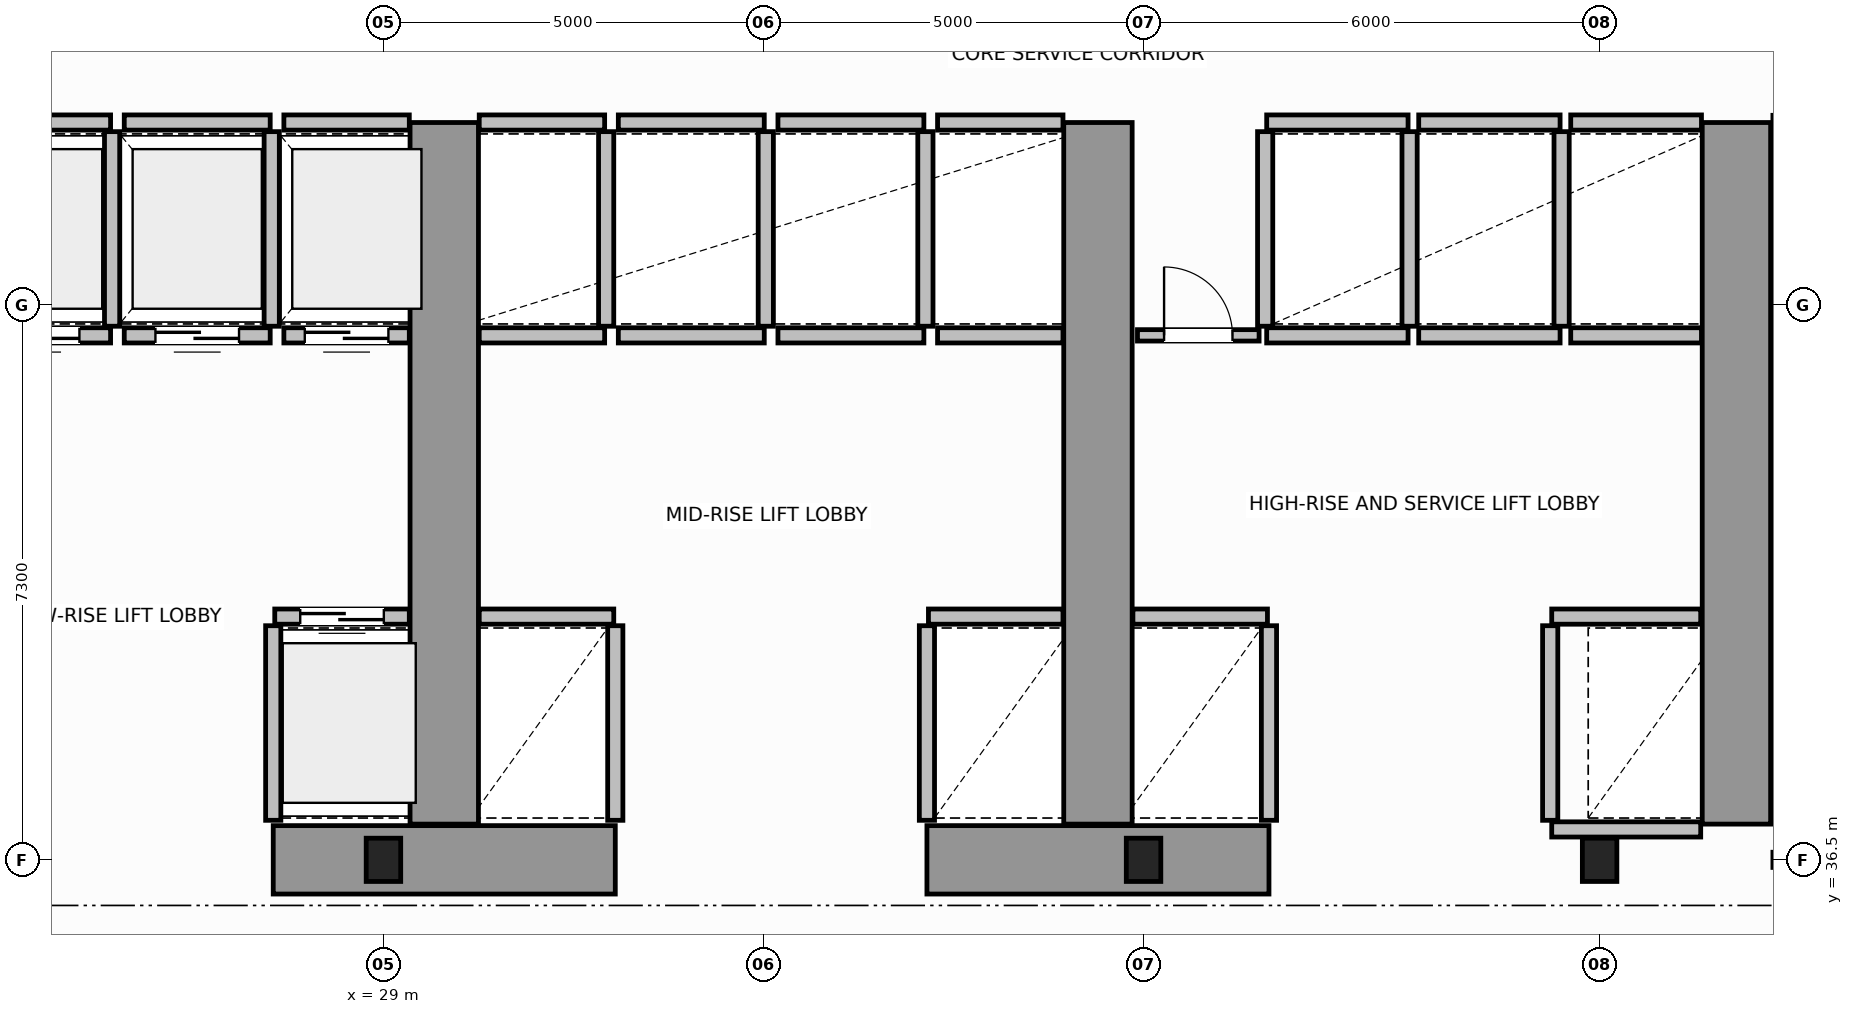
"""IFC4 building model, lengths in metres.
Left out: names, types, materials, properties, quantities, classifications, styles, units other than length and angle.
Written with IfcOpenShell. Run it as: python <this file> out.ifc"""

import sys

from ifc_helpers import new_model, si_unit, direction, frame, frame_2d, origin, origin_2d, place, context, subcontext, project, spatial, rectangle, i_section, extrude, source, transform, mapped, element, fill, save


model = new_model("IFC4")
c1 = context("Model", 3, precision=1e-05, world=origin(), true_north=direction((0.0, 1.0)))
c2 = subcontext(c1, "Body", "Model", "MODEL_VIEW")
j1 = project(units=[si_unit("LENGTHUNIT", "METRE"), si_unit("PLANEANGLEUNIT", "RADIAN")], contexts=[c1])
p1 = place(None, origin())
s1 = spatial("IfcSite", under=j1, at=p1, CompositionType="ELEMENT")
p2 = place(p1, origin())
s2 = spatial("IfcBuilding", under=s1, at=p2, CompositionType="ELEMENT")
p3 = place(p2, frame((0.0, 0.0, 18.8)))
s3 = spatial("IfcBuildingStorey", under=s2, at=p3, CompositionType="ELEMENT", Elevation=18.8)
m1 = source(origin(), c2, "Body", "SweptSolid", [
    extrude(i_section(OverallWidth=0.454, OverallDepth=0.569, WebThickness=0.078, FlangeThickness=0.08, FilletRadius=0.015, at=origin_2d()), origin(), (0.0, 0.0, 1.0), 3.8),
])
for number, where, z_axis, x_axis in (
    (1, (29.0, 36.5, 0.0), (0.0, 0.0, 1.0), (1.0, 0.0, 0.0)),
    (2, (39.0, 36.5, 0.0), (0.0, 0.0, 1.0), (1.0, 0.0, 0.0)),
    (3, (45.0, 36.5, 0.0), (0.0, 0.0, 1.0), (1.0, 0.0, 0.0)),
):
    element("IfcColumn", number, at=place(p3, frame(where, z_axis=z_axis, x_axis=x_axis)), inside=s3, PredefinedType="COLUMN", context=c2, shape_type="MappedRepresentation", body=[
        mapped(m1, transform((0.0, 0.0, 0.0), scale=1.0)),
    ])
for number, where, z_axis, x_axis in (
    (4, (27.55, 36.5, 0.0), (0.0, 0.0, 1.0), (1.0, 0.0, 0.0)),
    (5, (36.15, 36.5, 0.0), (0.0, 0.0, 1.0), (1.0, 0.0, 0.0)),
):
    element("IfcWall", number, at=place(p3, frame(where, z_axis=z_axis, x_axis=x_axis)), inside=s3, PredefinedType="SHEAR", context=c2, shape_type="SweptSolid", body=[
        extrude(rectangle(XDim=4.5, YDim=0.9, at=frame_2d((2.25, 0.0))), origin(), (0.0, 0.0, 1.0), 3.8),
    ])
for number, where, z_axis, x_axis in (
    (6, (29.8, 36.97, 0.0), (0.0, 0.0, 1.0), (0.0, 1.0, 0.0)),
    (7, (38.4, 36.97, 0.0), (0.0, 0.0, 1.0), (0.0, 1.0, 0.0)),
    (8, (46.8, 36.97, 0.0), (0.0, 0.0, 1.0), (0.0, 1.0, 0.0)),
):
    element("IfcWall", number, at=place(p3, frame(where, z_axis=z_axis, x_axis=x_axis)), inside=s3, PredefinedType="SHEAR", context=c2, shape_type="SweptSolid", body=[
        extrude(rectangle(XDim=9.23, YDim=0.9, at=frame_2d((4.615, 0.0))), origin(), (0.0, 0.0, 1.0), 3.8),
    ])
p4 = place(p3, frame((47.28, 36.5, 0.0), z_axis=(0.0, 0.0, 1.0), x_axis=(1.0, 0.0, 0.0)))
e9 = element("IfcWall", 9, at=p4, inside=s3, PredefinedType="SOLIDWALL", context=c2, shape_type="SweptSolid", body=[
    extrude(rectangle(XDim=2.47, YDim=0.2, at=frame_2d((1.235, 0.0))), origin(), (0.0, 0.0, 1.0), 2.37),
])
p5 = place(p4, frame((0.65, 0.0, 0.0)))
e10 = element("IfcOpeningElement", 10, at=p5, cuts=e9, PredefinedType="OPENING", context=c2, shape_type="SweptSolid", body=[
    extrude(rectangle(XDim=1.1, YDim=2.15, at=frame_2d((0.55, 1.075))), frame((0.0, 0.11, 0.0), z_axis=(0.0, -1.0, 0.0), x_axis=(1.0, 0.0, 0.0)), (0.0, 0.0, 1.0), 0.22),
])
p6 = place(p3, frame((27.57, 39.7, 0.0), z_axis=(0.0, 0.0, 1.0), x_axis=(1.0, 0.0, 0.0)))
e11 = element("IfcWall", 11, at=p6, inside=s3, PredefinedType="SOLIDWALL", context=c2, shape_type="SweptSolid", body=[
    extrude(rectangle(XDim=1.77, YDim=0.2, at=frame_2d((0.885, 0.0))), origin(), (0.0, 0.0, 1.0), 3.58),
])
p7 = place(p6, frame((0.335, 0.0, 0.0)))
e12 = element("IfcOpeningElement", 12, at=p7, cuts=e11, PredefinedType="OPENING", context=c2, shape_type="SweptSolid", body=[
    extrude(rectangle(XDim=1.1, YDim=2.15, at=frame_2d((0.55, 1.075))), frame((0.0, 0.11, 0.0), z_axis=(0.0, -1.0, 0.0), x_axis=(1.0, 0.0, 0.0)), (0.0, 0.0, 1.0), 0.22),
])
p8 = place(p3, frame((27.55, 37.02, 0.0), z_axis=(0.0, 0.0, 1.0), x_axis=(0.0, 1.0, 0.0)))
e13 = element("IfcWall", 13, at=p8, inside=s3, PredefinedType="SOLIDWALL", context=c2, shape_type="SweptSolid", body=[
    extrude(rectangle(XDim=2.56, YDim=0.2, at=frame_2d((1.28, 0.0))), origin(), (0.0, 0.0, 1.0), 3.58),
])
p9 = place(p3, frame((23.49, 43.4, 0.0), z_axis=(0.0, 0.0, 1.0), x_axis=(1.0, 0.0, 0.0)))
e14 = element("IfcWall", 14, at=p9, inside=s3, PredefinedType="SOLIDWALL", context=c2, shape_type="SweptSolid", body=[
    extrude(rectangle(XDim=1.92, YDim=0.2, at=frame_2d((0.96, 0.0))), origin(), (0.0, 0.0, 1.0), 3.58),
])
p10 = place(p9, frame((0.41, 0.0, 0.0)))
e15 = element("IfcOpeningElement", 15, at=p10, cuts=e14, PredefinedType="OPENING", context=c2, shape_type="SweptSolid", body=[
    extrude(rectangle(XDim=1.1, YDim=2.15, at=frame_2d((0.55, 1.075))), frame((0.0, 0.11, 0.0), z_axis=(0.0, -1.0, 0.0), x_axis=(1.0, 0.0, 0.0)), (0.0, 0.0, 1.0), 0.22),
])
p11 = place(p3, frame((23.49, 46.2, 0.0), z_axis=(0.0, 0.0, 1.0), x_axis=(1.0, 0.0, 0.0)))
e16 = element("IfcWall", 16, at=p11, inside=s3, PredefinedType="SOLIDWALL", context=c2, shape_type="SweptSolid", body=[
    extrude(rectangle(XDim=1.92, YDim=0.2, at=frame_2d((0.96, 0.0))), origin(), (0.0, 0.0, 1.0), 3.58),
])
p12 = place(p3, frame((25.43, 43.52, 0.0), z_axis=(0.0, 0.0, 1.0), x_axis=(0.0, 1.0, 0.0)))
e17 = element("IfcWall", 17, at=p12, inside=s3, PredefinedType="SOLIDWALL", context=c2, shape_type="SweptSolid", body=[
    extrude(rectangle(XDim=2.56, YDim=0.2, at=frame_2d((1.28, 0.0))), origin(), (0.0, 0.0, 1.0), 3.58),
])
p13 = place(p3, frame((25.59, 43.4, 0.0), z_axis=(0.0, 0.0, 1.0), x_axis=(1.0, 0.0, 0.0)))
e18 = element("IfcWall", 18, at=p13, inside=s3, PredefinedType="SOLIDWALL", context=c2, shape_type="SweptSolid", body=[
    extrude(rectangle(XDim=1.92, YDim=0.2, at=frame_2d((0.96, 0.0))), origin(), (0.0, 0.0, 1.0), 3.58),
])
p14 = place(p13, frame((0.41, 0.0, 0.0)))
e19 = element("IfcOpeningElement", 19, at=p14, cuts=e18, PredefinedType="OPENING", context=c2, shape_type="SweptSolid", body=[
    extrude(rectangle(XDim=1.1, YDim=2.15, at=frame_2d((0.55, 1.075))), frame((0.0, 0.11, 0.0), z_axis=(0.0, -1.0, 0.0), x_axis=(1.0, 0.0, 0.0)), (0.0, 0.0, 1.0), 0.22),
])
p15 = place(p3, frame((25.59, 46.2, 0.0), z_axis=(0.0, 0.0, 1.0), x_axis=(1.0, 0.0, 0.0)))
e20 = element("IfcWall", 20, at=p15, inside=s3, PredefinedType="SOLIDWALL", context=c2, shape_type="SweptSolid", body=[
    extrude(rectangle(XDim=1.92, YDim=0.2, at=frame_2d((0.96, 0.0))), origin(), (0.0, 0.0, 1.0), 3.58),
])
p16 = place(p3, frame((27.53, 43.52, 0.0), z_axis=(0.0, 0.0, 1.0), x_axis=(0.0, 1.0, 0.0)))
e21 = element("IfcWall", 21, at=p16, inside=s3, PredefinedType="SOLIDWALL", context=c2, shape_type="SweptSolid", body=[
    extrude(rectangle(XDim=2.56, YDim=0.2, at=frame_2d((1.28, 0.0))), origin(), (0.0, 0.0, 1.0), 3.58),
])
p17 = place(p3, frame((27.69, 43.4, 0.0), z_axis=(0.0, 0.0, 1.0), x_axis=(1.0, 0.0, 0.0)))
e22 = element("IfcWall", 22, at=p17, inside=s3, PredefinedType="SOLIDWALL", context=c2, shape_type="SweptSolid", body=[
    extrude(rectangle(XDim=1.65, YDim=0.2, at=frame_2d((0.825, 0.0))), origin(), (0.0, 0.0, 1.0), 3.58),
])
p18 = place(p17, frame((0.275, 0.0, 0.0)))
e23 = element("IfcOpeningElement", 23, at=p18, cuts=e22, PredefinedType="OPENING", context=c2, shape_type="SweptSolid", body=[
    extrude(rectangle(XDim=1.1, YDim=2.15, at=frame_2d((0.55, 1.075))), frame((0.0, 0.11, 0.0), z_axis=(0.0, -1.0, 0.0), x_axis=(1.0, 0.0, 0.0)), (0.0, 0.0, 1.0), 0.22),
])
p19 = place(p3, frame((27.69, 46.2, 0.0), z_axis=(0.0, 0.0, 1.0), x_axis=(1.0, 0.0, 0.0)))
e24 = element("IfcWall", 24, at=p19, inside=s3, PredefinedType="SOLIDWALL", context=c2, shape_type="SweptSolid", body=[
    extrude(rectangle(XDim=1.65, YDim=0.2, at=frame_2d((0.825, 0.0))), origin(), (0.0, 0.0, 1.0), 3.58),
])
p20 = place(p3, frame((30.26, 39.7, 0.0), z_axis=(0.0, 0.0, 1.0), x_axis=(1.0, 0.0, 0.0)))
e25 = element("IfcWall", 25, at=p20, inside=s3, PredefinedType="SOLIDWALL", context=c2, shape_type="SweptSolid", body=[
    extrude(rectangle(XDim=1.77, YDim=0.2, at=frame_2d((0.885, 0.0))), origin(), (0.0, 0.0, 1.0), 3.58),
])
p21 = place(p3, frame((32.05, 37.02, 0.0), z_axis=(0.0, 0.0, 1.0), x_axis=(0.0, 1.0, 0.0)))
e26 = element("IfcWall", 26, at=p21, inside=s3, PredefinedType="SOLIDWALL", context=c2, shape_type="SweptSolid", body=[
    extrude(rectangle(XDim=2.56, YDim=0.2, at=frame_2d((1.28, 0.0))), origin(), (0.0, 0.0, 1.0), 3.58),
])
p22 = place(p3, frame((36.17, 39.7, 0.0), z_axis=(0.0, 0.0, 1.0), x_axis=(1.0, 0.0, 0.0)))
e27 = element("IfcWall", 27, at=p22, inside=s3, PredefinedType="SOLIDWALL", context=c2, shape_type="SweptSolid", body=[
    extrude(rectangle(XDim=1.77, YDim=0.2, at=frame_2d((0.885, 0.0))), origin(), (0.0, 0.0, 1.0), 3.58),
])
p23 = place(p3, frame((36.15, 37.02, 0.0), z_axis=(0.0, 0.0, 1.0), x_axis=(0.0, 1.0, 0.0)))
e28 = element("IfcWall", 28, at=p23, inside=s3, PredefinedType="SOLIDWALL", context=c2, shape_type="SweptSolid", body=[
    extrude(rectangle(XDim=2.56, YDim=0.2, at=frame_2d((1.28, 0.0))), origin(), (0.0, 0.0, 1.0), 3.58),
])
for number, where, z_axis, x_axis in (
    (29, (30.26, 43.4, 0.0), (0.0, 0.0, 1.0), (1.0, 0.0, 0.0)),
    (30, (30.26, 46.2, 0.0), (0.0, 0.0, 1.0), (1.0, 0.0, 0.0)),
):
    element("IfcWall", number, at=place(p3, frame(where, z_axis=z_axis, x_axis=x_axis)), inside=s3, PredefinedType="SOLIDWALL", context=c2, shape_type="SweptSolid", body=[
        extrude(rectangle(XDim=1.65, YDim=0.2, at=frame_2d((0.825, 0.0))), origin(), (0.0, 0.0, 1.0), 3.58),
    ])
p24 = place(p3, frame((31.93, 43.52, 0.0), z_axis=(0.0, 0.0, 1.0), x_axis=(0.0, 1.0, 0.0)))
e31 = element("IfcWall", 31, at=p24, inside=s3, PredefinedType="SOLIDWALL", context=c2, shape_type="SweptSolid", body=[
    extrude(rectangle(XDim=2.56, YDim=0.2, at=frame_2d((1.28, 0.0))), origin(), (0.0, 0.0, 1.0), 3.58),
])
for number, where, z_axis, x_axis in (
    (32, (32.09, 43.4, 0.0), (0.0, 0.0, 1.0), (1.0, 0.0, 0.0)),
    (33, (32.09, 46.2, 0.0), (0.0, 0.0, 1.0), (1.0, 0.0, 0.0)),
):
    element("IfcWall", number, at=place(p3, frame(where, z_axis=z_axis, x_axis=x_axis)), inside=s3, PredefinedType="SOLIDWALL", context=c2, shape_type="SweptSolid", body=[
        extrude(rectangle(XDim=1.92, YDim=0.2, at=frame_2d((0.96, 0.0))), origin(), (0.0, 0.0, 1.0), 3.58),
    ])
p25 = place(p3, frame((34.03, 43.52, 0.0), z_axis=(0.0, 0.0, 1.0), x_axis=(0.0, 1.0, 0.0)))
e34 = element("IfcWall", 34, at=p25, inside=s3, PredefinedType="SOLIDWALL", context=c2, shape_type="SweptSolid", body=[
    extrude(rectangle(XDim=2.56, YDim=0.2, at=frame_2d((1.28, 0.0))), origin(), (0.0, 0.0, 1.0), 3.58),
])
for number, where, z_axis, x_axis in (
    (35, (34.19, 43.4, 0.0), (0.0, 0.0, 1.0), (1.0, 0.0, 0.0)),
    (36, (34.19, 46.2, 0.0), (0.0, 0.0, 1.0), (1.0, 0.0, 0.0)),
):
    element("IfcWall", number, at=place(p3, frame(where, z_axis=z_axis, x_axis=x_axis)), inside=s3, PredefinedType="SOLIDWALL", context=c2, shape_type="SweptSolid", body=[
        extrude(rectangle(XDim=1.92, YDim=0.2, at=frame_2d((0.96, 0.0))), origin(), (0.0, 0.0, 1.0), 3.58),
    ])
p26 = place(p3, frame((36.13, 43.52, 0.0), z_axis=(0.0, 0.0, 1.0), x_axis=(0.0, 1.0, 0.0)))
e37 = element("IfcWall", 37, at=p26, inside=s3, PredefinedType="SOLIDWALL", context=c2, shape_type="SweptSolid", body=[
    extrude(rectangle(XDim=2.56, YDim=0.2, at=frame_2d((1.28, 0.0))), origin(), (0.0, 0.0, 1.0), 3.58),
])
for number, where, z_axis, x_axis in (
    (38, (36.29, 43.4, 0.0), (0.0, 0.0, 1.0), (1.0, 0.0, 0.0)),
    (39, (36.29, 46.2, 0.0), (0.0, 0.0, 1.0), (1.0, 0.0, 0.0)),
):
    element("IfcWall", number, at=place(p3, frame(where, z_axis=z_axis, x_axis=x_axis)), inside=s3, PredefinedType="SOLIDWALL", context=c2, shape_type="SweptSolid", body=[
        extrude(rectangle(XDim=1.65, YDim=0.2, at=frame_2d((0.825, 0.0))), origin(), (0.0, 0.0, 1.0), 3.58),
    ])
p27 = place(p3, frame((38.86, 39.7, 0.0), z_axis=(0.0, 0.0, 1.0), x_axis=(1.0, 0.0, 0.0)))
e40 = element("IfcWall", 40, at=p27, inside=s3, PredefinedType="SOLIDWALL", context=c2, shape_type="SweptSolid", body=[
    extrude(rectangle(XDim=1.77, YDim=0.2, at=frame_2d((0.885, 0.0))), origin(), (0.0, 0.0, 1.0), 3.58),
])
p28 = place(p3, frame((40.65, 37.02, 0.0), z_axis=(0.0, 0.0, 1.0), x_axis=(0.0, 1.0, 0.0)))
e41 = element("IfcWall", 41, at=p28, inside=s3, PredefinedType="SOLIDWALL", context=c2, shape_type="SweptSolid", body=[
    extrude(rectangle(XDim=2.56, YDim=0.2, at=frame_2d((1.28, 0.0))), origin(), (0.0, 0.0, 1.0), 3.58),
])
p29 = place(p3, frame((44.37, 39.7, 0.0), z_axis=(0.0, 0.0, 1.0), x_axis=(1.0, 0.0, 0.0)))
e42 = element("IfcWall", 42, at=p29, inside=s3, PredefinedType="SOLIDWALL", context=c2, shape_type="SweptSolid", body=[
    extrude(rectangle(XDim=1.96, YDim=0.2, at=frame_2d((0.98, 0.0))), origin(), (0.0, 0.0, 1.0), 3.58),
])
p30 = place(p3, frame((44.37, 36.9, 0.0), z_axis=(0.0, 0.0, 1.0), x_axis=(1.0, 0.0, 0.0)))
e43 = element("IfcWall", 43, at=p30, inside=s3, PredefinedType="SOLIDWALL", context=c2, shape_type="SweptSolid", body=[
    extrude(rectangle(XDim=1.96, YDim=0.2, at=frame_2d((0.98, 0.0))), origin(), (0.0, 0.0, 1.0), 2.37),
])
p31 = place(p3, frame((44.35, 37.02, 0.0), z_axis=(0.0, 0.0, 1.0), x_axis=(0.0, 1.0, 0.0)))
e44 = element("IfcWall", 44, at=p31, inside=s3, PredefinedType="SOLIDWALL", context=c2, shape_type="SweptSolid", body=[
    extrude(rectangle(XDim=2.56, YDim=0.2, at=frame_2d((1.28, 0.0))), origin(), (0.0, 0.0, 1.0), 3.58),
])
for number, where, z_axis, x_axis in (
    (45, (40.62, 43.4, 0.0), (0.0, 0.0, 1.0), (1.0, 0.0, 0.0)),
    (46, (40.62, 46.2, 0.0), (0.0, 0.0, 1.0), (1.0, 0.0, 0.0)),
):
    element("IfcWall", number, at=place(p3, frame(where, z_axis=z_axis, x_axis=x_axis)), inside=s3, PredefinedType="SOLIDWALL", context=c2, shape_type="SweptSolid", body=[
        extrude(rectangle(XDim=1.86, YDim=0.2, at=frame_2d((0.93, 0.0))), origin(), (0.0, 0.0, 1.0), 3.58),
    ])
for number, where, z_axis, x_axis in (
    (47, (40.6, 43.52, 0.0), (0.0, 0.0, 1.0), (0.0, 1.0, 0.0)),
    (48, (42.5, 43.52, 0.0), (0.0, 0.0, 1.0), (0.0, 1.0, 0.0)),
):
    element("IfcWall", number, at=place(p3, frame(where, z_axis=z_axis, x_axis=x_axis)), inside=s3, PredefinedType="SOLIDWALL", context=c2, shape_type="SweptSolid", body=[
        extrude(rectangle(XDim=2.56, YDim=0.2, at=frame_2d((1.28, 0.0))), origin(), (0.0, 0.0, 1.0), 3.58),
    ])
for number, where, z_axis, x_axis in (
    (49, (42.62, 43.4, 0.0), (0.0, 0.0, 1.0), (1.0, 0.0, 0.0)),
    (50, (42.62, 46.2, 0.0), (0.0, 0.0, 1.0), (1.0, 0.0, 0.0)),
):
    element("IfcWall", number, at=place(p3, frame(where, z_axis=z_axis, x_axis=x_axis)), inside=s3, PredefinedType="SOLIDWALL", context=c2, shape_type="SweptSolid", body=[
        extrude(rectangle(XDim=1.86, YDim=0.2, at=frame_2d((0.93, 0.0))), origin(), (0.0, 0.0, 1.0), 3.58),
    ])
p32 = place(p3, frame((44.5, 43.52, 0.0), z_axis=(0.0, 0.0, 1.0), x_axis=(0.0, 1.0, 0.0)))
e51 = element("IfcWall", 51, at=p32, inside=s3, PredefinedType="SOLIDWALL", context=c2, shape_type="SweptSolid", body=[
    extrude(rectangle(XDim=2.56, YDim=0.2, at=frame_2d((1.28, 0.0))), origin(), (0.0, 0.0, 1.0), 3.58),
])
for number, where, z_axis, x_axis in (
    (52, (44.62, 43.4, 0.0), (0.0, 0.0, 1.0), (1.0, 0.0, 0.0)),
    (53, (44.62, 46.2, 0.0), (0.0, 0.0, 1.0), (1.0, 0.0, 0.0)),
):
    element("IfcWall", number, at=place(p3, frame(where, z_axis=z_axis, x_axis=x_axis)), inside=s3, PredefinedType="SOLIDWALL", context=c2, shape_type="SweptSolid", body=[
        extrude(rectangle(XDim=1.72, YDim=0.2, at=frame_2d((0.86, 0.0))), origin(), (0.0, 0.0, 1.0), 3.58),
    ])
p33 = place(p3, frame((47.26, 39.95, 0.0), z_axis=(0.0, 0.0, 1.0), x_axis=(1.0, 0.0, 0.0)))
e54 = element("IfcWall", 54, at=p33, inside=s3, PredefinedType="SOLIDWALL", context=c2, shape_type="SweptSolid", body=[
    extrude(rectangle(XDim=2.07, YDim=0.2, at=frame_2d((1.035, 0.0))), origin(), (0.0, 0.0, 1.0), 3.58),
])
p34 = place(p33, frame((0.485, 0.0, 0.0)))
e55 = element("IfcOpeningElement", 55, at=p34, cuts=e54, PredefinedType="OPENING", context=c2, shape_type="SweptSolid", body=[
    extrude(rectangle(XDim=1.1, YDim=2.15, at=frame_2d((0.55, 1.075))), frame((0.0, 0.11, 0.0), z_axis=(0.0, -1.0, 0.0), x_axis=(1.0, 0.0, 0.0)), (0.0, 0.0, 1.0), 0.22),
])
p35 = place(p3, frame((47.26, 42.75, 0.0), z_axis=(0.0, 0.0, 1.0), x_axis=(1.0, 0.0, 0.0)))
e56 = element("IfcWall", 56, at=p35, inside=s3, PredefinedType="SOLIDWALL", context=c2, shape_type="SweptSolid", body=[
    extrude(rectangle(XDim=2.07, YDim=0.2, at=frame_2d((1.035, 0.0))), origin(), (0.0, 0.0, 1.0), 3.58),
])
p36 = place(p3, frame((47.28, 46.22, 0.0), z_axis=(0.0, 0.0, 1.0), x_axis=(1.0, 0.0, 0.0)))
e57 = element("IfcWall", 57, at=p36, inside=s3, PredefinedType="PARTITIONING", context=c2, shape_type="SweptSolid", body=[
    extrude(rectangle(XDim=2.1, YDim=0.15, at=frame_2d((1.05, 0.0))), origin(), (0.0, 0.0, 1.0), 3.58),
])
p37 = place(p36, frame((0.55, 0.0, 0.0)))
e58 = element("IfcOpeningElement", 58, at=p37, cuts=e57, PredefinedType="OPENING", context=c2, shape_type="SweptSolid", body=[
    extrude(rectangle(XDim=0.9, YDim=2.1, at=frame_2d((0.45, 1.05))), frame((0.0, 0.085, 0.0), z_axis=(0.0, -1.0, 0.0), x_axis=(1.0, 0.0, 0.0)), (0.0, 0.0, 1.0), 0.17),
])
p38 = place(p3, frame((38.92, 43.4, 0.0), z_axis=(0.0, 0.0, 1.0), x_axis=(1.0, 0.0, 0.0)))
e59 = element("IfcWall", 59, at=p38, inside=s3, PredefinedType="PARTITIONING", context=c2, shape_type="SweptSolid", body=[
    extrude(rectangle(XDim=1.6, YDim=0.15, at=frame_2d((0.8, 0.0))), origin(), (0.0, 0.0, 1.0), 3.58),
])
p39 = place(p38, frame((0.35, 0.0, 0.0)))
e60 = element("IfcOpeningElement", 60, at=p39, cuts=e59, PredefinedType="OPENING", context=c2, shape_type="SweptSolid", body=[
    extrude(rectangle(XDim=0.9, YDim=2.1, at=frame_2d((0.45, 1.05))), frame((0.0, 0.085, 0.0), z_axis=(0.0, -1.0, 0.0), x_axis=(1.0, 0.0, 0.0)), (0.0, 0.0, 1.0), 0.17),
])
m2 = source(origin(), c2, "Body", "SweptSolid", [
    extrude(rectangle(XDim=1.1, YDim=2.15, at=frame_2d((0.55, 1.075))), frame((0.0, 0.025, 0.0), z_axis=(0.0, -1.0, 0.0), x_axis=(1.0, 0.0, 0.0)), (0.0, 0.0, 1.0), 0.05),
])
p40 = place(p7, origin())
e61 = element("IfcDoor", 61, at=p40, inside=s3, OperationType="DOUBLE_DOOR_SLIDING", PredefinedType="DOOR", context=c2, shape_type="MappedRepresentation", body=[
    mapped(m2, transform((0.0, 0.0, 0.0), scale=1.0)),
])
fill(e12, e61)
p41 = place(p10, origin())
e62 = element("IfcDoor", 62, at=p41, inside=s3, OperationType="DOUBLE_DOOR_SLIDING", PredefinedType="DOOR", context=c2, shape_type="MappedRepresentation", body=[
    mapped(m2, transform((0.0, 0.0, 0.0), scale=1.0)),
])
fill(e15, e62)
p42 = place(p14, origin())
e63 = element("IfcDoor", 63, at=p42, inside=s3, OperationType="DOUBLE_DOOR_SLIDING", PredefinedType="DOOR", context=c2, shape_type="MappedRepresentation", body=[
    mapped(m2, transform((0.0, 0.0, 0.0), scale=1.0)),
])
fill(e19, e63)
p43 = place(p18, origin())
e64 = element("IfcDoor", 64, at=p43, inside=s3, OperationType="DOUBLE_DOOR_SLIDING", PredefinedType="DOOR", context=c2, shape_type="MappedRepresentation", body=[
    mapped(m2, transform((0.0, 0.0, 0.0), scale=1.0)),
])
fill(e23, e64)
m3 = source(origin(), c2, "Body", "SweptSolid", [
    extrude(rectangle(XDim=0.9, YDim=2.1, at=frame_2d((0.45, 1.05))), frame((0.0, 0.025, 0.0), z_axis=(0.0, -1.0, 0.0), x_axis=(1.0, 0.0, 0.0)), (0.0, 0.0, 1.0), 0.05),
])
p44 = place(p39, origin())
e65 = element("IfcDoor", 65, at=p44, inside=s3, OperationType="SINGLE_SWING_LEFT", PredefinedType="DOOR", context=c2, shape_type="MappedRepresentation", body=[
    mapped(m3, transform((0.0, 0.0, 0.0), scale=1.0)),
])
fill(e60, e65)
save(model, sys.argv[1])
